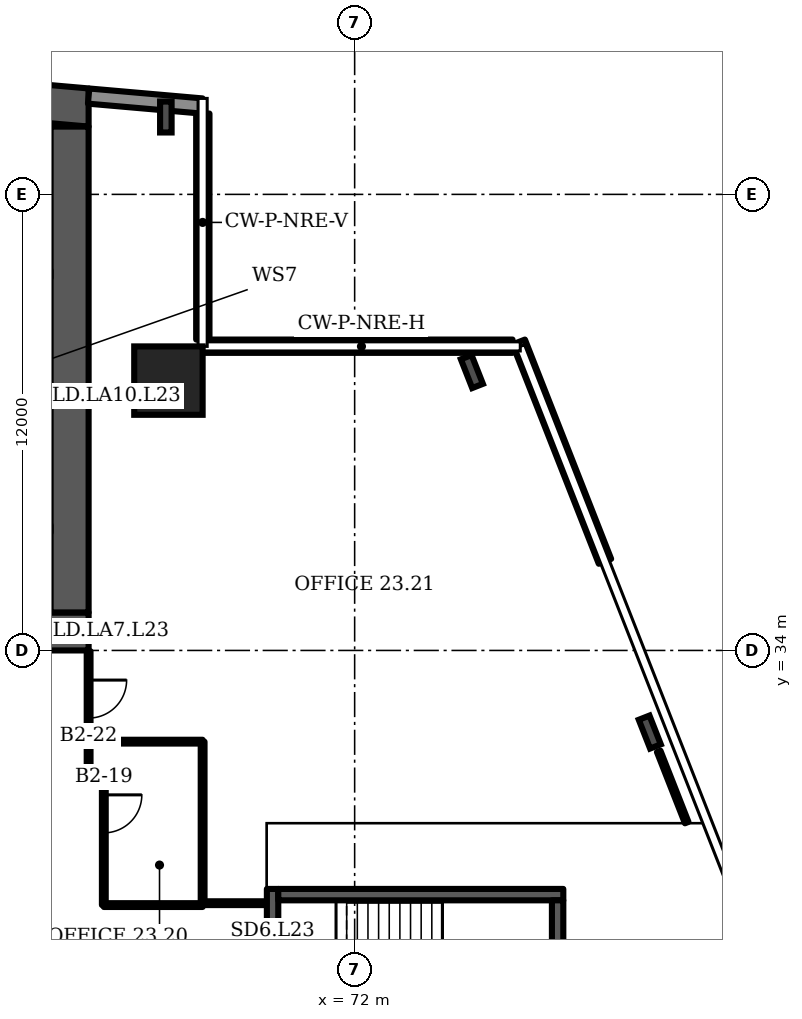
"""IFC4 building model, lengths in metres.
Left out: names, types, materials, properties, quantities, classifications, styles, units other than length and angle.
Written with IfcOpenShell. Run it as: python <this file> out.ifc"""

import sys

from ifc_helpers import new_model, si_unit, direction, frame, frame_2d, origin, origin_2d, place, context, subcontext, project, spatial, polyline, rectangle, i_section, outline, extrude, element, fill, save


model = new_model("IFC4")
c1 = context("Model", 3, precision=1e-05, world=origin(), true_north=direction((0.0, 1.0)))
c2 = subcontext(c1, "Body", "Model", "MODEL_VIEW")
j1 = project(units=[si_unit("LENGTHUNIT", "METRE"), si_unit("PLANEANGLEUNIT", "RADIAN")], contexts=[c1])
p1 = place(None, origin())
s1 = spatial("IfcSite", under=j1, at=p1, CompositionType="ELEMENT")
p2 = place(p1, origin())
s2 = spatial("IfcBuilding", under=s1, at=p2, CompositionType="ELEMENT")
p3 = place(p2, frame((0.0, 0.0, 103.9)))
s3 = spatial("IfcBuildingStorey", under=s2, at=p3, CompositionType="ELEMENT", Elevation=103.9)
p4 = place(p3, origin())
e1 = element("IfcWall", 1, at=p4, inside=s3, PredefinedType="SHEAR", context=c2, shape_type="SweptSolid", body=[
    extrude(outline(polyline([(16.0, 47.784), (40.5, 49.927), (65.0, 47.784), (65.0, 48.787), (40.5, 50.931), (16.0, 48.787), (16.0, 47.784)])), origin(), (0.0, 0.0, 1.0), 3.6),
])
p5 = place(p3, frame((16.0, 34.5, 0.0), z_axis=(0.0, 0.0, 1.0), x_axis=(1.0, 0.0, 0.0)))
e2 = element("IfcWall", 2, at=p5, inside=s3, PredefinedType="SHEAR", context=c2, shape_type="SweptSolid", body=[
    extrude(rectangle(XDim=49.0, YDim=1.0, at=frame_2d((24.5, 0.0))), origin(), (0.0, 0.0, 1.0), 3.6),
])
p6 = place(p5, frame((1.2, 0.0, 0.0)))
e3 = element("IfcOpeningElement", 3, at=p6, cuts=e2, PredefinedType="OPENING", context=c2, shape_type="SweptSolid", body=[
    extrude(rectangle(XDim=1.1, YDim=2.1, at=frame_2d((0.55, 1.05))), frame((0.0, 0.51, 0.0), z_axis=(0.0, -1.0, 0.0), x_axis=(1.0, 0.0, 0.0)), (0.0, 0.0, 1.0), 1.02),
])
p7 = place(p5, frame((5.083, 0.0, 0.0)))
e4 = element("IfcOpeningElement", 4, at=p7, cuts=e2, PredefinedType="OPENING", context=c2, shape_type="SweptSolid", body=[
    extrude(rectangle(XDim=1.1, YDim=2.1, at=frame_2d((0.55, 1.05))), frame((0.0, 0.51, 0.0), z_axis=(0.0, -1.0, 0.0), x_axis=(1.0, 0.0, 0.0)), (0.0, 0.0, 1.0), 1.02),
])
p8 = place(p5, frame((2.933, 0.0, 0.0)))
e5 = element("IfcOpeningElement", 5, at=p8, cuts=e2, PredefinedType="OPENING", context=c2, shape_type="SweptSolid", body=[
    extrude(rectangle(XDim=1.4, YDim=2.1, at=frame_2d((0.7, 1.05))), frame((0.0, 0.51, 0.0), z_axis=(0.0, -1.0, 0.0), x_axis=(1.0, 0.0, 0.0)), (0.0, 0.0, 1.0), 1.02),
])
p9 = place(p5, frame((7.65, 0.0, 0.0)))
e6 = element("IfcOpeningElement", 6, at=p9, cuts=e2, PredefinedType="OPENING", context=c2, shape_type="SweptSolid", body=[
    extrude(rectangle(XDim=1.2, YDim=2.1, at=frame_2d((0.6, 1.05))), frame((0.0, 0.51, 0.0), z_axis=(0.0, -1.0, 0.0), x_axis=(1.0, 0.0, 0.0)), (0.0, 0.0, 1.0), 1.02),
])
p10 = place(p5, frame((14.817, 0.0, 0.0)))
e7 = element("IfcOpeningElement", 7, at=p10, cuts=e2, PredefinedType="OPENING", context=c2, shape_type="SweptSolid", body=[
    extrude(rectangle(XDim=1.1, YDim=2.1, at=frame_2d((0.55, 1.05))), frame((0.0, 0.51, 0.0), z_axis=(0.0, -1.0, 0.0), x_axis=(1.0, 0.0, 0.0)), (0.0, 0.0, 1.0), 1.02),
])
p11 = place(p5, frame((19.083, 0.0, 0.0)))
e8 = element("IfcOpeningElement", 8, at=p11, cuts=e2, PredefinedType="OPENING", context=c2, shape_type="SweptSolid", body=[
    extrude(rectangle(XDim=1.1, YDim=2.1, at=frame_2d((0.55, 1.05))), frame((0.0, 0.51, 0.0), z_axis=(0.0, -1.0, 0.0), x_axis=(1.0, 0.0, 0.0)), (0.0, 0.0, 1.0), 1.02),
])
p12 = place(p5, frame((16.8, 0.0, 0.0)))
e9 = element("IfcOpeningElement", 9, at=p12, cuts=e2, PredefinedType="OPENING", context=c2, shape_type="SweptSolid", body=[
    extrude(rectangle(XDim=1.4, YDim=2.1, at=frame_2d((0.7, 1.05))), frame((0.0, 0.51, 0.0), z_axis=(0.0, -1.0, 0.0), x_axis=(1.0, 0.0, 0.0)), (0.0, 0.0, 1.0), 1.02),
])
p13 = place(p5, frame((21.817, 0.0, 0.0)))
e10 = element("IfcOpeningElement", 10, at=p13, cuts=e2, PredefinedType="OPENING", context=c2, shape_type="SweptSolid", body=[
    extrude(rectangle(XDim=1.1, YDim=2.1, at=frame_2d((0.55, 1.05))), frame((0.0, 0.51, 0.0), z_axis=(0.0, -1.0, 0.0), x_axis=(1.0, 0.0, 0.0)), (0.0, 0.0, 1.0), 1.02),
])
p14 = place(p5, frame((26.083, 0.0, 0.0)))
e11 = element("IfcOpeningElement", 11, at=p14, cuts=e2, PredefinedType="OPENING", context=c2, shape_type="SweptSolid", body=[
    extrude(rectangle(XDim=1.1, YDim=2.1, at=frame_2d((0.55, 1.05))), frame((0.0, 0.51, 0.0), z_axis=(0.0, -1.0, 0.0), x_axis=(1.0, 0.0, 0.0)), (0.0, 0.0, 1.0), 1.02),
])
p15 = place(p5, frame((33.15, 0.0, 0.0)))
e12 = element("IfcOpeningElement", 12, at=p15, cuts=e2, PredefinedType="OPENING", context=c2, shape_type="SweptSolid", body=[
    extrude(rectangle(XDim=1.2, YDim=2.1, at=frame_2d((0.6, 1.05))), frame((0.0, 0.51, 0.0), z_axis=(0.0, -1.0, 0.0), x_axis=(1.0, 0.0, 0.0)), (0.0, 0.0, 1.0), 1.02),
])
p16 = place(p5, frame((37.8, 0.0, 0.0)))
e13 = element("IfcOpeningElement", 13, at=p16, cuts=e2, PredefinedType="OPENING", context=c2, shape_type="SweptSolid", body=[
    extrude(rectangle(XDim=1.4, YDim=2.1, at=frame_2d((0.7, 1.05))), frame((0.0, 0.51, 0.0), z_axis=(0.0, -1.0, 0.0), x_axis=(1.0, 0.0, 0.0)), (0.0, 0.0, 1.0), 1.02),
])
p17 = place(p5, frame((42.817, 0.0, 0.0)))
e14 = element("IfcOpeningElement", 14, at=p17, cuts=e2, PredefinedType="OPENING", context=c2, shape_type="SweptSolid", body=[
    extrude(rectangle(XDim=1.1, YDim=2.1, at=frame_2d((0.55, 1.05))), frame((0.0, 0.51, 0.0), z_axis=(0.0, -1.0, 0.0), x_axis=(1.0, 0.0, 0.0)), (0.0, 0.0, 1.0), 1.02),
])
p18 = place(p5, frame((46.7, 0.0, 0.0)))
e15 = element("IfcOpeningElement", 15, at=p18, cuts=e2, PredefinedType="OPENING", context=c2, shape_type="SweptSolid", body=[
    extrude(rectangle(XDim=1.1, YDim=2.1, at=frame_2d((0.55, 1.05))), frame((0.0, 0.51, 0.0), z_axis=(0.0, -1.0, 0.0), x_axis=(1.0, 0.0, 0.0)), (0.0, 0.0, 1.0), 1.02),
])
p19 = place(p5, frame((44.667, 0.0, 0.0)))
e16 = element("IfcOpeningElement", 16, at=p19, cuts=e2, PredefinedType="OPENING", context=c2, shape_type="SweptSolid", body=[
    extrude(rectangle(XDim=1.4, YDim=2.1, at=frame_2d((0.7, 1.05))), frame((0.0, 0.51, 0.0), z_axis=(0.0, -1.0, 0.0), x_axis=(1.0, 0.0, 0.0)), (0.0, 0.0, 1.0), 1.02),
])
p20 = place(p3, frame((64.5, 35.0, 0.0), z_axis=(0.0, 0.0, 1.0), x_axis=(0.0, 1.0, 0.0)))
e17 = element("IfcWall", 17, at=p20, inside=s3, PredefinedType="SHEAR", context=c2, shape_type="SweptSolid", body=[
    extrude(rectangle(XDim=12.784, YDim=1.0, at=frame_2d((6.392, 0.0))), origin(), (0.0, 0.0, 1.0), 3.6),
])
p21 = place(p3, frame((67.1, 41.1, 0.0), z_axis=(0.0, 0.0, 1.0), x_axis=(1.0, 0.0, 0.0)))
e18 = element("IfcColumn", 18, at=p21, inside=s3, PredefinedType="COLUMN", context=c2, shape_type="SweptSolid", body=[
    extrude(rectangle(XDim=1.8, YDim=1.8, at=origin_2d()), origin(), (0.0, 0.0, 1.0), 3.6),
])
for number, where, z_axis, x_axis in (
    (19, (79.766, 31.853, 0.0), (0.0, 0.0, 1.0), (0.931, 0.366, 0.0)),
    (20, (75.085, 41.338, 0.0), (0.0, 0.0, 1.0), (0.931, 0.366, 0.0)),
    (21, (67.032, 48.036, 0.0), (0.0, 0.0, 1.0), (1.0, 0.0, 0.0)),
):
    element("IfcColumn", number, at=place(p3, frame(where, z_axis=z_axis, x_axis=x_axis)), inside=s3, PredefinedType="COLUMN", context=c2, shape_type="SweptSolid", body=[
        extrude(i_section(OverallWidth=0.303, OverallDepth=0.814, WebThickness=0.021, FlangeThickness=0.04, FilletRadius=0.03, at=origin_2d()), origin(), (0.0, 0.0, 1.0), 3.6),
    ])
p22 = place(p3, frame((67.983, 48.326, 0.0), z_axis=(0.0, 0.0, 1.0), x_axis=(-0.996194, 0.087168, 0.0)))
e22 = element("IfcWall", 22, at=p22, inside=s3, PredefinedType="SOLIDWALL", context=c2, shape_type="SweptSolid", body=[
    extrude(rectangle(XDim=2.994, YDim=0.4, at=frame_2d((1.497, 0.0))), origin(), (0.0, 0.0, 1.0), 3.2),
])
p23 = place(p3, frame((78.586, 36.344, 0.0), z_axis=(0.0, 0.0, 1.0), x_axis=(-0.365792, 0.930699, 0.0)))
e23 = element("IfcWall", 23, at=p23, inside=s3, PredefinedType="SOLIDWALL", context=c2, shape_type="SweptSolid", body=[
    extrude(rectangle(XDim=6.202, YDim=0.35, at=frame_2d((3.101, 0.0))), origin(), (0.0, 0.0, 1.0), 1.0),
])
p24 = place(p3, frame((76.155, 42.005, 0.0), z_axis=(0.0, 0.0, 1.0), x_axis=(-1.0, 0.0, 0.0)))
e24 = element("IfcWall", 24, at=p24, inside=s3, PredefinedType="SOLIDWALL", context=c2, shape_type="SweptSolid", body=[
    extrude(rectangle(XDim=8.155, YDim=0.35, at=frame_2d((4.078, 0.0))), origin(), (0.0, 0.0, 1.0), 1.0),
])
p25 = place(p3, frame((68.005, 42.18, 0.0), z_axis=(0.0, 0.0, 1.0), x_axis=(0.0, 1.0, 0.0)))
e25 = element("IfcWall", 25, at=p25, inside=s3, PredefinedType="SOLIDWALL", context=c2, shape_type="SweptSolid", body=[
    extrude(rectangle(XDim=5.947, YDim=0.35, at=frame_2d((2.973, 0.0))), origin(), (0.0, 0.0, 1.0), 1.0),
])
p26 = place(p3, frame((69.84, 23.375, 0.0), z_axis=(0.0, 0.0, 1.0), x_axis=(0.0, 1.0, 0.0)))
e26 = element("IfcWall", 26, at=p26, inside=s3, PredefinedType="SHEAR", context=c2, shape_type="SweptSolid", body=[
    extrude(rectangle(XDim=4.35, YDim=0.3, at=frame_2d((2.175, 0.0))), origin(), (0.0, 0.0, 1.0), 3.2),
])
p27 = place(p26, frame((1.575, 0.0, 0.0)))
e27 = element("IfcOpeningElement", 27, at=p27, cuts=e26, PredefinedType="OPENING", context=c2, shape_type="SweptSolid", body=[
    extrude(rectangle(XDim=1.2, YDim=2.1, at=frame_2d((0.6, 1.05))), frame((0.0, 0.16, 0.0), z_axis=(0.0, -1.0, 0.0), x_axis=(1.0, 0.0, 0.0)), (0.0, 0.0, 1.0), 0.32),
])
p28 = place(p3, frame((65.0, 30.56, 0.0), z_axis=(0.0, 0.0, 1.0), x_axis=(0.0, 1.0, 0.0)))
e28 = element("IfcWall", 28, at=p28, inside=s3, PredefinedType="PARTITIONING", context=c2, shape_type="SweptSolid", body=[
    extrude(rectangle(XDim=3.42, YDim=0.1, at=frame_2d((1.71, 0.0))), origin(), (0.0, 0.0, 1.0), 3.2),
])
p29 = place(p28, frame((1.66, 0.0, 0.0)))
e29 = element("IfcOpeningElement", 29, at=p29, cuts=e28, PredefinedType="OPENING", context=c2, shape_type="SweptSolid", body=[
    extrude(rectangle(XDim=1.0, YDim=2.1, at=frame_2d((0.5, 1.05))), frame((0.0, 0.06, 0.0), z_axis=(0.0, -1.0, 0.0), x_axis=(1.0, 0.0, 0.0)), (0.0, 0.0, 1.0), 0.12),
])
p30 = place(p3, frame((65.0, 31.6, 0.0), z_axis=(0.0, 0.0, 1.0), x_axis=(1.0, 0.0, 0.0)))
e30 = element("IfcWall", 30, at=p30, inside=s3, PredefinedType="PARTITIONING", context=c2, shape_type="SweptSolid", body=[
    extrude(rectangle(XDim=3.0, YDim=0.1, at=frame_2d((1.5, 0.0))), origin(), (0.0, 0.0, 1.0), 3.2),
])
p31 = place(p3, frame((65.395, 30.5, 0.0), z_axis=(0.0, 0.0, 1.0), x_axis=(-0.988637, 0.150312, 0.0)))
e31 = element("IfcWall", 31, at=p31, inside=s3, PredefinedType="PARTITIONING", context=c2, shape_type="SweptSolid", body=[
    extrude(rectangle(XDim=0.4, YDim=0.1, at=frame_2d((0.2, 0.0))), origin(), (0.0, 0.0, 1.0), 3.2),
])
p32 = place(p3, frame((65.4, 27.3, 0.0), z_axis=(0.0, 0.0, 1.0), x_axis=(0.0, 1.0, 0.0)))
e32 = element("IfcWall", 32, at=p32, inside=s3, PredefinedType="PARTITIONING", context=c2, shape_type="SweptSolid", body=[
    extrude(rectangle(XDim=3.2, YDim=0.1, at=frame_2d((1.6, 0.0))), origin(), (0.0, 0.0, 1.0), 3.2),
])
p33 = place(p32, frame((1.9, 0.0, 0.0)))
e33 = element("IfcOpeningElement", 33, at=p33, cuts=e32, PredefinedType="OPENING", context=c2, shape_type="SweptSolid", body=[
    extrude(rectangle(XDim=1.0, YDim=2.1, at=frame_2d((0.5, 1.05))), frame((0.0, 0.06, 0.0), z_axis=(0.0, -1.0, 0.0), x_axis=(1.0, 0.0, 0.0)), (0.0, 0.0, 1.0), 0.12),
])
p34 = place(p3, frame((65.4, 27.3, 0.0), z_axis=(0.0, 0.0, 1.0), x_axis=(1.0, 0.0, 0.0)))
e34 = element("IfcWall", 34, at=p34, inside=s3, PredefinedType="PARTITIONING", context=c2, shape_type="SweptSolid", body=[
    extrude(rectangle(XDim=2.6, YDim=0.1, at=frame_2d((1.3, 0.0))), origin(), (0.0, 0.0, 1.0), 3.2),
])
p35 = place(p3, frame((68.0, 27.3, 0.0), z_axis=(0.0, 0.0, 1.0), x_axis=(0.0, 1.0, 0.0)))
e35 = element("IfcWall", 35, at=p35, inside=s3, PredefinedType="PARTITIONING", context=c2, shape_type="SweptSolid", body=[
    extrude(rectangle(XDim=4.3, YDim=0.1, at=frame_2d((2.15, 0.0))), origin(), (0.0, 0.0, 1.0), 3.2),
])
p36 = place(p3, frame((68.05, 27.35, 0.0), z_axis=(0.0, 0.0, 1.0), x_axis=(1.0, 0.0, 0.0)))
e36 = element("IfcWall", 36, at=p36, inside=s3, PredefinedType="PARTITIONING", context=c2, shape_type="SweptSolid", body=[
    extrude(rectangle(XDim=1.62, YDim=0.1, at=frame_2d((0.81, 0.0))), origin(), (0.0, 0.0, 1.0), 3.2),
])
p37 = place(p3, frame((80.737, 29.47, 0.0), z_axis=(0.0, 0.0, 1.0), x_axis=(-0.365847, 0.930674, 0.0)))
e37 = element("IfcWall", 37, at=p37, inside=s3, PredefinedType="PARTITIONING", context=c2, shape_type="SweptSolid", body=[
    extrude(rectangle(XDim=2.015, YDim=0.1, at=frame_2d((1.007, 0.0))), origin(), (0.0, 0.0, 1.0), 2.58),
])
p38 = place(p3, frame((69.99, 27.575, 0.0), z_axis=(0.0, 0.0, 1.0), x_axis=(1.0, 0.0, 0.0)))
e38 = element("IfcWall", 38, at=p38, inside=s3, PredefinedType="SHEAR", context=c2, shape_type="SweptSolid", body=[
    extrude(rectangle(XDim=7.5, YDim=0.3, at=frame_2d((3.75, 0.0))), origin(), (0.0, 0.0, 1.0), 3.2),
])
p39 = place(p3, frame((77.34, 23.675, 0.0), z_axis=(0.0, 0.0, 1.0), x_axis=(0.0, 1.0, 0.0)))
e39 = element("IfcWall", 39, at=p39, inside=s3, PredefinedType="SHEAR", context=c2, shape_type="SweptSolid", body=[
    extrude(rectangle(XDim=3.75, YDim=0.3, at=frame_2d((1.875, 0.0))), origin(), (0.0, 0.0, 1.0), 3.2),
])
p40 = place(p33, origin())
e40 = element("IfcDoor", 40, at=p40, inside=s3, OperationType="SINGLE_SWING_RIGHT", PredefinedType="DOOR", context=c2, shape_type="SweptSolid", body=[
    extrude(rectangle(XDim=1.0, YDim=2.1, at=frame_2d((0.5, 1.05))), frame((0.0, 0.025, 0.0), z_axis=(0.0, -1.0, 0.0), x_axis=(1.0, 0.0, 0.0)), (0.0, 0.0, 1.0), 0.05),
])
fill(e33, e40)
p41 = place(p29, origin())
e41 = element("IfcDoor", 41, at=p41, inside=s3, OperationType="SINGLE_SWING_RIGHT", PredefinedType="DOOR", context=c2, shape_type="SweptSolid", body=[
    extrude(rectangle(XDim=1.0, YDim=2.1, at=frame_2d((0.5, 1.05))), frame((0.0, 0.025, 0.0), z_axis=(0.0, -1.0, 0.0), x_axis=(1.0, 0.0, 0.0)), (0.0, 0.0, 1.0), 0.05),
])
fill(e29, e41)
save(model, sys.argv[1])
